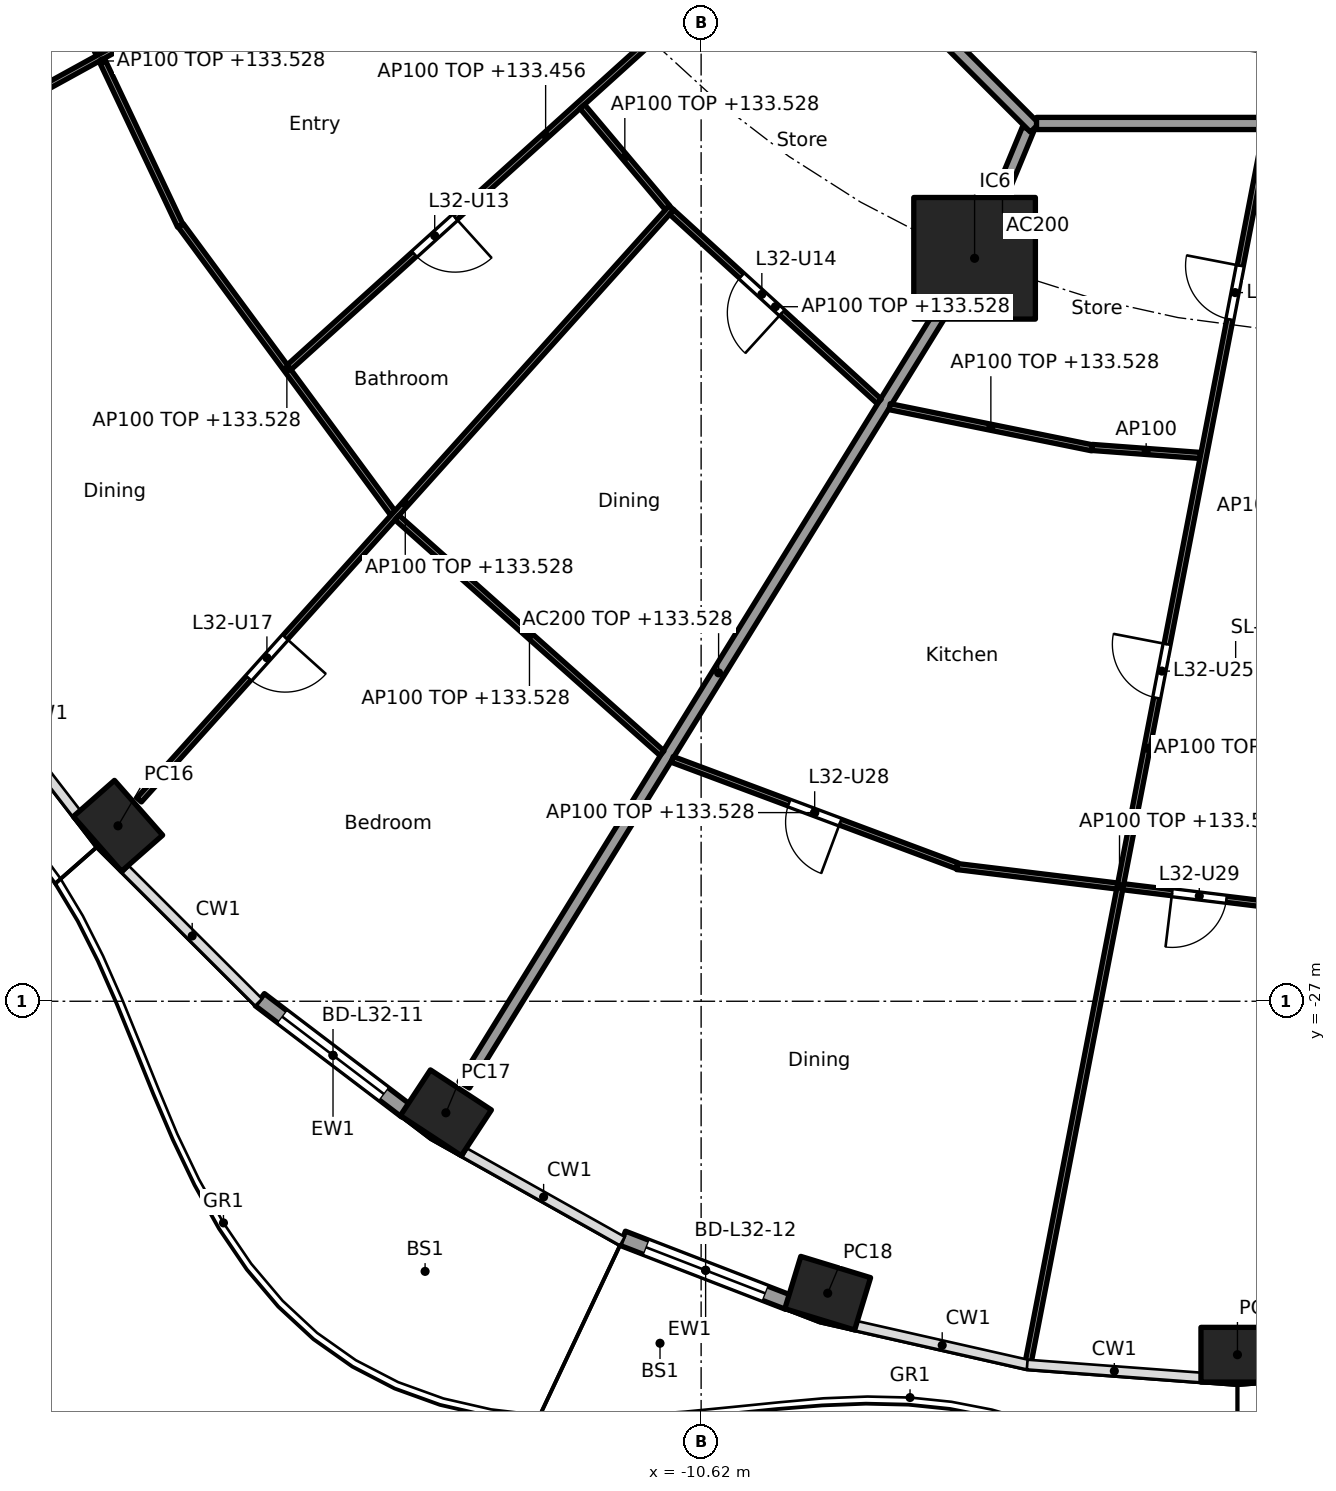
"""IFC4 building model, lengths in metres.
Left out: names, types, materials, properties, quantities, classifications, styles, units other than length and angle.
Written with IfcOpenShell. Run it as: python <this file> out.ifc"""

import sys

from ifc_helpers import new_model, si_unit, direction, frame, frame_2d, origin, origin_2d, place, context, subcontext, project, spatial, rectangle, hollow_rectangle, extrude, element, fill, save


model = new_model("IFC4")
c1 = context("Model", 3, precision=1e-05, world=origin(), true_north=direction((0.0, 1.0)))
c2 = subcontext(c1, "Body", "Model", "MODEL_VIEW")
j1 = project(units=[si_unit("LENGTHUNIT", "METRE"), si_unit("PLANEANGLEUNIT", "RADIAN")], contexts=[c1])
p1 = place(None, origin())
s1 = spatial("IfcSite", under=j1, at=p1, CompositionType="ELEMENT")
p2 = place(p1, origin())
s2 = spatial("IfcBuilding", under=s1, at=p2, CompositionType="ELEMENT")
p3 = place(p2, frame((0.0, 0.0, 130.7)))
s3 = spatial("IfcBuildingStorey", under=s2, at=p3, CompositionType="ELEMENT", Elevation=130.7)
for number, where, z_axis, x_axis in (
    (1, (-20.209, -24.115, 0.0), (0.0, 0.0, 1.0), (0.66, -0.751, 0.0)),
    (2, (-14.817, -28.834, 0.0), (0.0, 0.0, 1.0), (0.836, -0.549, 0.0)),
    (3, (-8.538, -31.801, 0.0), (0.0, 0.0, 1.0), (0.957, -0.292, 0.0)),
    (4, (-1.8, -32.813, 0.0), (0.0, 0.0, 1.0), (1.0, 0.0, 0.0)),
):
    element("IfcColumn", number, at=place(p3, frame(where, z_axis=z_axis, x_axis=x_axis)), inside=s3, PredefinedType="COLUMN", context=c2, shape_type="SweptSolid", body=[
        extrude(hollow_rectangle(XDim=1.2, YDim=0.9, WallThickness=0.04, at=origin_2d()), origin(), (0.0, 0.0, 1.0), 3.7),
    ])
p4 = place(p3, frame((-6.123, -14.782, 0.0), z_axis=(0.0, 0.0, 1.0), x_axis=(1.0, 0.0, 0.0)))
e5 = element("IfcColumn", 5, at=p4, inside=s3, PredefinedType="COLUMN", context=c2, shape_type="SweptSolid", body=[
    extrude(rectangle(XDim=2.0, YDim=2.0, at=origin_2d()), origin(), (0.0, 0.0, 1.0), 3.7),
])
p5 = place(p3, frame((-15.469, -28.805, 0.0), z_axis=(0.0, 0.0, 1.0), x_axis=(-0.796022231079, 0.605267385233, 0.0)))
e6 = element("IfcWall", 6, at=p5, inside=s3, PredefinedType="SOLIDWALL", context=c2, shape_type="SweptSolid", body=[
    extrude(rectangle(XDim=3.026, YDim=0.25, at=frame_2d((1.513, 0.0))), origin(), (0.0, 0.0, 1.0), 3.44),
])
p6 = place(p5, frame((0.463, 0.0, 0.0)))
e7 = element("IfcOpeningElement", 7, at=p6, cuts=e6, PredefinedType="OPENING", context=c2, shape_type="SweptSolid", body=[
    extrude(rectangle(XDim=2.1, YDim=2.4, at=frame_2d((1.05, 1.2))), frame((0.0, 0.135, 0.0), z_axis=(0.0, -1.0, 0.0), x_axis=(1.0, 0.0, 0.0)), (0.0, 0.0, 1.0), 0.27),
])
p7 = place(p3, frame((-9.182, -31.951, 0.0), z_axis=(0.0, 0.0, 1.0), x_axis=(-0.932845344347, 0.360277064952, 0.0)))
e8 = element("IfcWall", 8, at=p7, inside=s3, PredefinedType="SOLIDWALL", context=c2, shape_type="SweptSolid", body=[
    extrude(rectangle(XDim=2.923, YDim=0.25, at=frame_2d((1.462, 0.0))), origin(), (0.0, 0.0, 1.0), 3.44),
])
p8 = place(p7, frame((0.412, 0.0, 0.0)))
e9 = element("IfcOpeningElement", 9, at=p8, cuts=e8, PredefinedType="OPENING", context=c2, shape_type="SweptSolid", body=[
    extrude(rectangle(XDim=2.1, YDim=2.4, at=frame_2d((1.05, 1.2))), frame((0.0, 0.135, 0.0), z_axis=(0.0, -1.0, 0.0), x_axis=(1.0, 0.0, 0.0)), (0.0, 0.0, 1.0), 0.27),
])
p9 = place(p3, frame((-5.243, -12.657, 0.0), z_axis=(0.0, 0.0, 1.0), x_axis=(-0.382818775282, -0.923823460025, 0.0)))
e10 = element("IfcWall", 10, at=p9, inside=s3, PredefinedType="PARTITIONING", context=c2, shape_type="SweptSolid", body=[
    extrude(rectangle(XDim=2.201, YDim=0.2, at=frame_2d((1.101, 0.0))), origin(), (0.0, 0.0, 1.0), 3.44),
])
p10 = place(p3, frame((-6.149, -14.825, 0.0), z_axis=(0.0, 0.0, 1.0), x_axis=(-0.525406383516, -0.85085141603, 0.0)))
e11 = element("IfcWall", 11, at=p10, inside=s3, PredefinedType="PARTITIONING", context=c2, shape_type="SweptSolid", body=[
    extrude(rectangle(XDim=15.925, YDim=0.2, at=frame_2d((7.962, 0.0))), origin(), (0.0, 0.0, 1.0), 2.828),
])
p11 = place(p3, frame((-12.635, -5.134, 0.0), z_axis=(0.0, 0.0, 1.0), x_axis=(0.707106781187, -0.707106781187, 0.0)))
e12 = element("IfcWall", 12, at=p11, inside=s3, PredefinedType="PARTITIONING", context=c2, shape_type="SweptSolid", body=[
    extrude(rectangle(XDim=10.609, YDim=0.2, at=frame_2d((5.305, 0.0))), origin(), (0.0, 0.0, 1.0), 3.44),
])
p12 = place(p11, frame((3.07, 0.0, 0.0)))
e13 = element("IfcOpeningElement", 13, at=p12, cuts=e12, PredefinedType="OPENING", context=c2, shape_type="SweptSolid", body=[
    extrude(rectangle(XDim=1.0, YDim=2.1, at=frame_2d((0.5, 1.05))), frame((0.0, 0.11, 0.0), z_axis=(0.0, -1.0, 0.0), x_axis=(1.0, 0.0, 0.0)), (0.0, 0.0, 1.0), 0.22),
])
p13 = place(p3, frame((-5.104, -12.565, 0.0), z_axis=(0.0, 0.0, 1.0), x_axis=(1.0, 0.0, 0.0)))
e14 = element("IfcWall", 14, at=p13, inside=s3, PredefinedType="PARTITIONING", context=c2, shape_type="SweptSolid", body=[
    extrude(rectangle(XDim=10.409, YDim=0.2, at=frame_2d((5.205, 0.0))), origin(), (0.0, 0.0, 1.0), 3.44),
])
p14 = place(p13, frame((4.604, 0.0, 0.0)))
e15 = element("IfcOpeningElement", 15, at=p14, cuts=e14, PredefinedType="OPENING", context=c2, shape_type="SweptSolid", body=[
    extrude(rectangle(XDim=1.0, YDim=2.1, at=frame_2d((0.5, 1.05))), frame((0.0, 0.11, 0.0), z_axis=(0.0, -1.0, 0.0), x_axis=(1.0, 0.0, 0.0)), (0.0, 0.0, 1.0), 0.22),
])
p15 = place(p3, frame((-21.75, -8.826, 0.0), z_axis=(0.0, 0.0, 1.0), x_axis=(0.427736419988, -0.903903509793, 0.0)))
e16 = element("IfcWall", 16, at=p15, inside=s3, PredefinedType="PARTITIONING", context=c2, shape_type="SweptSolid", body=[
    extrude(rectangle(XDim=5.999, YDim=0.1, at=frame_2d((3.0, 0.0))), origin(), (0.0, 0.0, 1.0), 2.828),
])
p16 = place(p3, frame((-11.426, -6.479, 0.0), z_axis=(0.0, 0.0, 1.0), x_axis=(-0.876110392495, -0.482110547657, 0.0)))
e17 = element("IfcWall", 17, at=p16, inside=s3, PredefinedType="PARTITIONING", context=c2, shape_type="SweptSolid", body=[
    extrude(rectangle(XDim=16.955, YDim=0.1, at=frame_2d((8.478, 0.0))), origin(), (0.0, 0.0, 1.0), 2.756),
])
p17 = place(p16, frame((0.35, 0.0, 0.0)))
e18 = element("IfcOpeningElement", 18, at=p17, cuts=e17, PredefinedType="OPENING", context=c2, shape_type="SweptSolid", body=[
    extrude(rectangle(XDim=0.9, YDim=2.1, at=frame_2d((0.45, 1.05))), frame((0.0, 0.06, 0.0), z_axis=(0.0, -1.0, 0.0), x_axis=(1.0, 0.0, 0.0)), (0.0, 0.0, 1.0), 0.12),
])
p18 = place(p16, frame((6.957, 0.0, 0.0)))
e19 = element("IfcOpeningElement", 19, at=p18, cuts=e17, PredefinedType="OPENING", context=c2, shape_type="SweptSolid", body=[
    extrude(rectangle(XDim=0.9, YDim=2.1, at=frame_2d((0.45, 1.05))), frame((0.0, 0.06, 0.0), z_axis=(0.0, -1.0, 0.0), x_axis=(1.0, 0.0, 0.0)), (0.0, 0.0, 1.0), 0.12),
])
p19 = place(p16, frame((13.206, 0.0, 0.0)))
e20 = element("IfcOpeningElement", 20, at=p19, cuts=e17, PredefinedType="OPENING", context=c2, shape_type="SweptSolid", body=[
    extrude(rectangle(XDim=0.9, YDim=2.1, at=frame_2d((0.45, 1.05))), frame((0.0, 0.06, 0.0), z_axis=(0.0, -1.0, 0.0), x_axis=(1.0, 0.0, 0.0)), (0.0, 0.0, 1.0), 0.12),
])
p20 = place(p3, frame((-19.176, -14.244, 0.0), z_axis=(0.0, 0.0, 1.0), x_axis=(0.593532053206, -0.80481035146, 0.0)))
e21 = element("IfcWall", 21, at=p20, inside=s3, PredefinedType="PARTITIONING", context=c2, shape_type="SweptSolid", body=[
    extrude(rectangle(XDim=5.876, YDim=0.1, at=frame_2d((2.938, 0.0))), origin(), (0.0, 0.0, 1.0), 2.828),
])
p21 = place(p3, frame((-8.959, -8.952, 0.0), z_axis=(0.0, 0.0, 1.0), x_axis=(-0.741982736283, -0.670418987692, 0.0)))
e22 = element("IfcWall", 22, at=p21, inside=s3, PredefinedType="PARTITIONING", context=c2, shape_type="SweptSolid", body=[
    extrude(rectangle(XDim=11.371, YDim=0.1, at=frame_2d((5.685, 0.0))), origin(), (0.0, 0.0, 1.0), 2.756),
])
p22 = place(p21, frame((2.009, 0.0, 0.0)))
e23 = element("IfcOpeningElement", 23, at=p22, cuts=e22, PredefinedType="OPENING", context=c2, shape_type="SweptSolid", body=[
    extrude(rectangle(XDim=0.9, YDim=2.1, at=frame_2d((0.45, 1.05))), frame((0.0, 0.06, 0.0), z_axis=(0.0, -1.0, 0.0), x_axis=(1.0, 0.0, 0.0)), (0.0, 0.0, 1.0), 0.12),
])
p23 = place(p21, frame((7.694, 0.0, 0.0)))
e24 = element("IfcOpeningElement", 24, at=p23, cuts=e22, PredefinedType="OPENING", context=c2, shape_type="SweptSolid", body=[
    extrude(rectangle(XDim=0.9, YDim=2.1, at=frame_2d((0.45, 1.05))), frame((0.0, 0.06, 0.0), z_axis=(0.0, -1.0, 0.0), x_axis=(1.0, 0.0, 0.0)), (0.0, 0.0, 1.0), 0.12),
])
p24 = place(p3, frame((-12.575, -12.286, 0.0), z_axis=(0.0, 0.0, 1.0), x_axis=(0.644052758448, -0.764981074495, 0.0)))
e25 = element("IfcWall", 25, at=p24, inside=s3, PredefinedType="PARTITIONING", context=c2, shape_type="SweptSolid", body=[
    extrude(rectangle(XDim=2.174, YDim=0.1, at=frame_2d((1.087, 0.0))), origin(), (0.0, 0.0, 1.0), 2.828),
])
p25 = place(p3, frame((-11.109, -13.951, 0.0), z_axis=(0.0, 0.0, 1.0), x_axis=(-0.668488676691, -0.743722319913, 0.0)))
e26 = element("IfcWall", 26, at=p25, inside=s3, PredefinedType="PARTITIONING", context=c2, shape_type="SweptSolid", body=[
    extrude(rectangle(XDim=13.094, YDim=0.1, at=frame_2d((6.547, 0.0))), origin(), (0.0, 0.0, 1.0), 2.828),
])
p26 = place(p25, frame((9.5, 0.0, 0.0)))
e27 = element("IfcOpeningElement", 27, at=p26, cuts=e26, PredefinedType="OPENING", context=c2, shape_type="SweptSolid", body=[
    extrude(rectangle(XDim=0.9, YDim=2.1, at=frame_2d((0.45, 1.05))), frame((0.0, 0.06, 0.0), z_axis=(0.0, -1.0, 0.0), x_axis=(1.0, 0.0, 0.0)), (0.0, 0.0, 1.0), 0.12),
])
p27 = place(p3, frame((-11.105, -14.021, 0.0), z_axis=(0.0, 0.0, 1.0), x_axis=(0.738880014758, -0.673837015747, 0.0)))
e28 = element("IfcWall", 28, at=p27, inside=s3, PredefinedType="PARTITIONING", context=c2, shape_type="SweptSolid", body=[
    extrude(rectangle(XDim=4.621, YDim=0.1, at=frame_2d((2.31, 0.0))), origin(), (0.0, 0.0, 1.0), 2.828),
])
p28 = place(p27, frame((1.558, 0.0, 0.0)))
e29 = element("IfcOpeningElement", 29, at=p28, cuts=e28, PredefinedType="OPENING", context=c2, shape_type="SweptSolid", body=[
    extrude(rectangle(XDim=0.9, YDim=2.1, at=frame_2d((0.45, 1.05))), frame((0.0, 0.06, 0.0), z_axis=(0.0, -1.0, 0.0), x_axis=(1.0, 0.0, 0.0)), (0.0, 0.0, 1.0), 0.12),
])
p29 = place(p3, frame((-15.622, -19.046, 0.0), z_axis=(0.0, 0.0, 1.0), x_axis=(0.747342322463, -0.664439201925, 0.0)))
e30 = element("IfcWall", 30, at=p29, inside=s3, PredefinedType="PARTITIONING", context=c2, shape_type="SweptSolid", body=[
    extrude(rectangle(XDim=5.831, YDim=0.1, at=frame_2d((2.916, 0.0))), origin(), (0.0, 0.0, 1.0), 2.828),
])
p30 = place(p3, frame((-7.52, -17.222, 0.0), z_axis=(0.0, 0.0, 1.0), x_axis=(0.979964966792, -0.199169937141, 0.0)))
e31 = element("IfcWall", 31, at=p30, inside=s3, PredefinedType="PARTITIONING", context=c2, shape_type="SweptSolid", body=[
    extrude(rectangle(XDim=3.397, YDim=0.1, at=frame_2d((1.698, 0.0))), origin(), (0.0, 0.0, 1.0), 2.828),
])
p31 = place(p3, frame((-11.096, -23.022, 0.0), z_axis=(0.0, 0.0, 1.0), x_axis=(0.936725688471, -0.350064257758, 0.0)))
e32 = element("IfcWall", 32, at=p31, inside=s3, PredefinedType="PARTITIONING", context=c2, shape_type="SweptSolid", body=[
    extrude(rectangle(XDim=5.003, YDim=0.1, at=frame_2d((2.501, 0.0))), origin(), (0.0, 0.0, 1.0), 2.828),
])
p32 = place(p31, frame((2.051, 0.0, 0.0)))
e33 = element("IfcOpeningElement", 33, at=p32, cuts=e32, PredefinedType="OPENING", context=c2, shape_type="SweptSolid", body=[
    extrude(rectangle(XDim=0.9, YDim=2.1, at=frame_2d((0.45, 1.05))), frame((0.0, 0.06, 0.0), z_axis=(0.0, -1.0, 0.0), x_axis=(1.0, 0.0, 0.0)), (0.0, 0.0, 1.0), 0.12),
])
p33 = place(p3, frame((-4.19, -17.893, 0.0), z_axis=(0.0, 0.0, 1.0), x_axis=(0.99727037024, -0.07383636395, 0.0)))
e34 = element("IfcWall", 34, at=p33, inside=s3, PredefinedType="PARTITIONING", context=c2, shape_type="SweptSolid", body=[
    extrude(rectangle(XDim=1.782, YDim=0.1, at=frame_2d((0.891, 0.0))), origin(), (0.0, 0.0, 1.0), 3.44),
])
p34 = place(p3, frame((-6.413, -24.784, 0.0), z_axis=(0.0, 0.0, 1.0), x_axis=(0.99268660964, -0.120719903255, 0.0)))
e35 = element("IfcWall", 35, at=p34, inside=s3, PredefinedType="PARTITIONING", context=c2, shape_type="SweptSolid", body=[
    extrude(rectangle(XDim=5.385, YDim=0.1, at=frame_2d((2.693, 0.0))), origin(), (0.0, 0.0, 1.0), 2.828),
])
p35 = place(p34, frame((3.564, 0.0, 0.0)))
e36 = element("IfcOpeningElement", 36, at=p35, cuts=e35, PredefinedType="OPENING", context=c2, shape_type="SweptSolid", body=[
    extrude(rectangle(XDim=0.9, YDim=2.1, at=frame_2d((0.45, 1.05))), frame((0.0, 0.06, 0.0), z_axis=(0.0, -1.0, 0.0), x_axis=(1.0, 0.0, 0.0)), (0.0, 0.0, 1.0), 0.12),
])
p36 = place(p3, frame((-1.32, -12.663, 0.0), z_axis=(0.0, 0.0, 1.0), x_axis=(-0.189865535907, -0.98181010296, 0.0)))
e37 = element("IfcWall", 37, at=p36, inside=s3, PredefinedType="PARTITIONING", context=c2, shape_type="SweptSolid", body=[
    extrude(rectangle(XDim=20.729, YDim=0.1, at=frame_2d((10.365, 0.0))), origin(), (0.0, 0.0, 1.0), 2.756),
])
p37 = place(p36, frame((2.283, 0.0, 0.0)))
e38 = element("IfcOpeningElement", 38, at=p37, cuts=e37, PredefinedType="OPENING", context=c2, shape_type="SweptSolid", body=[
    extrude(rectangle(XDim=0.9, YDim=2.1, at=frame_2d((0.45, 1.05))), frame((0.0, 0.06, 0.0), z_axis=(0.0, -1.0, 0.0), x_axis=(1.0, 0.0, 0.0)), (0.0, 0.0, 1.0), 0.12),
])
p38 = place(p36, frame((8.622, 0.0, 0.0)))
e39 = element("IfcOpeningElement", 39, at=p38, cuts=e37, PredefinedType="OPENING", context=c2, shape_type="SweptSolid", body=[
    extrude(rectangle(XDim=0.9, YDim=2.1, at=frame_2d((0.45, 1.05))), frame((0.0, 0.06, 0.0), z_axis=(0.0, -1.0, 0.0), x_axis=(1.0, 0.0, 0.0)), (0.0, 0.0, 1.0), 0.12),
])
p39 = place(p6, origin())
e40 = element("IfcDoor", 40, at=p39, inside=s3, OperationType="SLIDING_TO_LEFT", PredefinedType="DOOR", context=c2, shape_type="SweptSolid", body=[
    extrude(rectangle(XDim=2.1, YDim=2.4, at=frame_2d((1.05, 1.2))), frame((0.0, 0.025, 0.0), z_axis=(0.0, -1.0, 0.0), x_axis=(1.0, 0.0, 0.0)), (0.0, 0.0, 1.0), 0.05),
])
fill(e7, e40)
p40 = place(p8, origin())
e41 = element("IfcDoor", 41, at=p40, inside=s3, OperationType="SLIDING_TO_LEFT", PredefinedType="DOOR", context=c2, shape_type="SweptSolid", body=[
    extrude(rectangle(XDim=2.1, YDim=2.4, at=frame_2d((1.05, 1.2))), frame((0.0, 0.025, 0.0), z_axis=(0.0, -1.0, 0.0), x_axis=(1.0, 0.0, 0.0)), (0.0, 0.0, 1.0), 0.05),
])
fill(e9, e41)
p41 = place(p23, origin())
e42 = element("IfcDoor", 42, at=p41, inside=s3, OperationType="SINGLE_SWING_LEFT", PredefinedType="DOOR", context=c2, shape_type="SweptSolid", body=[
    extrude(rectangle(XDim=0.9, YDim=2.1, at=frame_2d((0.45, 1.05))), frame((0.0, 0.025, 0.0), z_axis=(0.0, -1.0, 0.0), x_axis=(1.0, 0.0, 0.0)), (0.0, 0.0, 1.0), 0.05),
])
fill(e24, e42)
p42 = place(p28, frame((0.9, 0.0, 0.0), x_axis=(-1.0, 0.0, 0.0)))
e43 = element("IfcDoor", 43, at=p42, inside=s3, OperationType="SINGLE_SWING_LEFT", PredefinedType="DOOR", context=c2, shape_type="SweptSolid", body=[
    extrude(rectangle(XDim=0.9, YDim=2.1, at=frame_2d((0.45, 1.05))), frame((0.0, 0.025, 0.0), z_axis=(0.0, -1.0, 0.0), x_axis=(1.0, 0.0, 0.0)), (0.0, 0.0, 1.0), 0.05),
])
fill(e29, e43)
p43 = place(p26, origin())
e44 = element("IfcDoor", 44, at=p43, inside=s3, OperationType="SINGLE_SWING_LEFT", PredefinedType="DOOR", context=c2, shape_type="SweptSolid", body=[
    extrude(rectangle(XDim=0.9, YDim=2.1, at=frame_2d((0.45, 1.05))), frame((0.0, 0.025, 0.0), z_axis=(0.0, -1.0, 0.0), x_axis=(1.0, 0.0, 0.0)), (0.0, 0.0, 1.0), 0.05),
])
fill(e27, e44)
p44 = place(p37, frame((0.9, 0.0, 0.0), x_axis=(-1.0, 0.0, 0.0)))
e45 = element("IfcDoor", 45, at=p44, inside=s3, OperationType="SINGLE_SWING_RIGHT", PredefinedType="DOOR", context=c2, shape_type="SweptSolid", body=[
    extrude(rectangle(XDim=0.9, YDim=2.1, at=frame_2d((0.45, 1.05))), frame((0.0, 0.025, 0.0), z_axis=(0.0, -1.0, 0.0), x_axis=(1.0, 0.0, 0.0)), (0.0, 0.0, 1.0), 0.05),
])
fill(e38, e45)
p45 = place(p38, frame((0.9, 0.0, 0.0), x_axis=(-1.0, 0.0, 0.0)))
e46 = element("IfcDoor", 46, at=p45, inside=s3, OperationType="SINGLE_SWING_RIGHT", PredefinedType="DOOR", context=c2, shape_type="SweptSolid", body=[
    extrude(rectangle(XDim=0.9, YDim=2.1, at=frame_2d((0.45, 1.05))), frame((0.0, 0.025, 0.0), z_axis=(0.0, -1.0, 0.0), x_axis=(1.0, 0.0, 0.0)), (0.0, 0.0, 1.0), 0.05),
])
fill(e39, e46)
p46 = place(p32, frame((0.9, 0.0, 0.0), x_axis=(-1.0, 0.0, 0.0)))
e47 = element("IfcDoor", 47, at=p46, inside=s3, OperationType="SINGLE_SWING_LEFT", PredefinedType="DOOR", context=c2, shape_type="SweptSolid", body=[
    extrude(rectangle(XDim=0.9, YDim=2.1, at=frame_2d((0.45, 1.05))), frame((0.0, 0.025, 0.0), z_axis=(0.0, -1.0, 0.0), x_axis=(1.0, 0.0, 0.0)), (0.0, 0.0, 1.0), 0.05),
])
fill(e33, e47)
p47 = place(p35, frame((0.9, 0.0, 0.0), x_axis=(-1.0, 0.0, 0.0)))
e48 = element("IfcDoor", 48, at=p47, inside=s3, OperationType="SINGLE_SWING_RIGHT", PredefinedType="DOOR", context=c2, shape_type="SweptSolid", body=[
    extrude(rectangle(XDim=0.9, YDim=2.1, at=frame_2d((0.45, 1.05))), frame((0.0, 0.025, 0.0), z_axis=(0.0, -1.0, 0.0), x_axis=(1.0, 0.0, 0.0)), (0.0, 0.0, 1.0), 0.05),
])
fill(e36, e48)
save(model, sys.argv[1])
